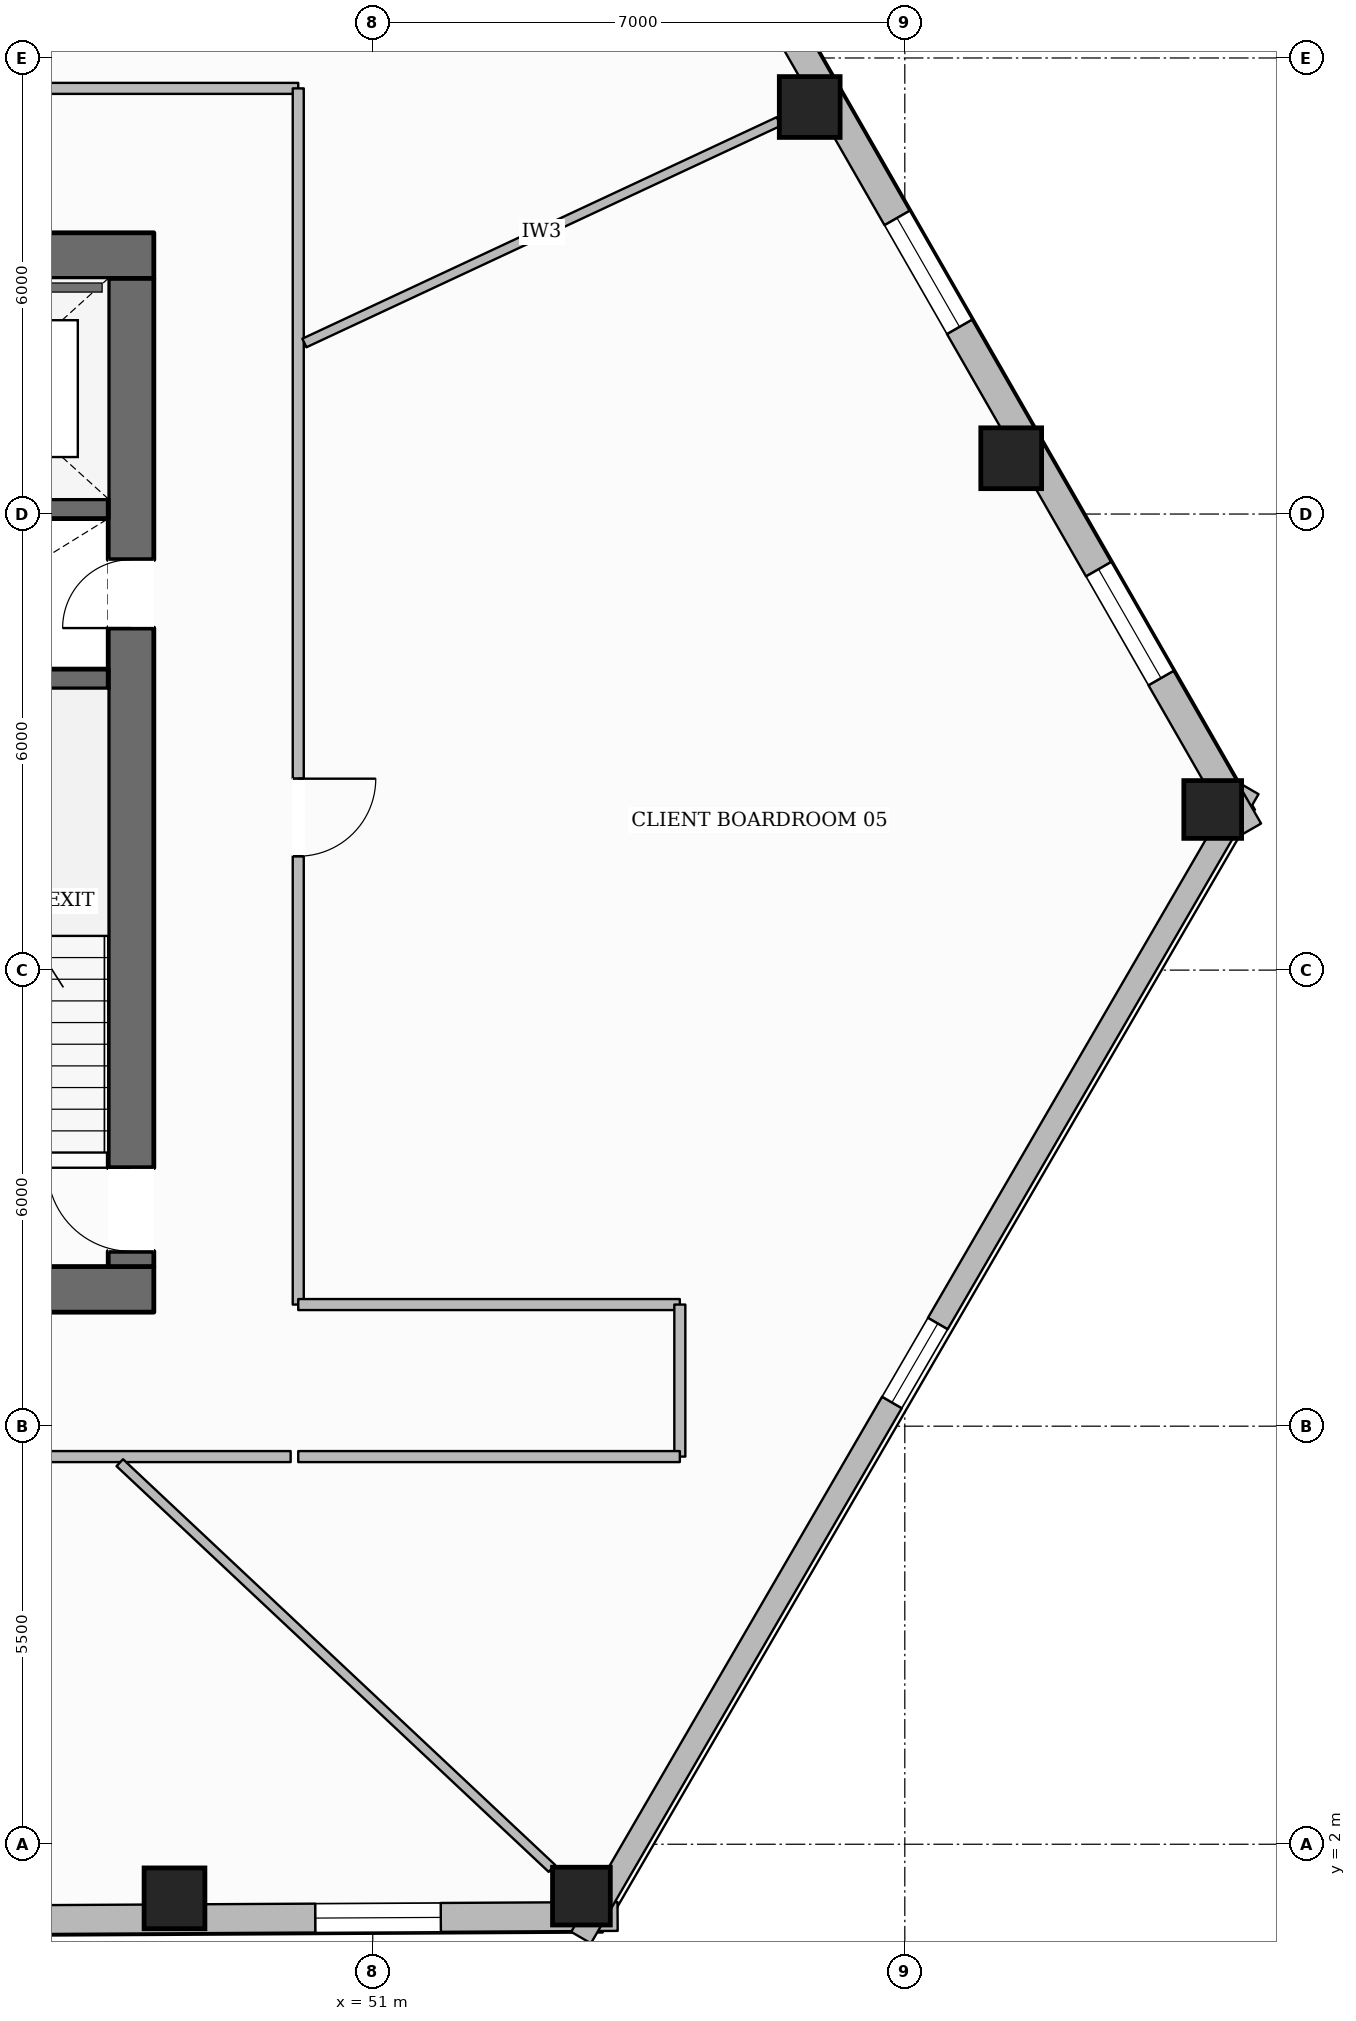
"""IFC4 building model, lengths in metres.
Left out: names, types, materials, properties, quantities, classifications, styles, units other than length and angle.
Written with IfcOpenShell. Run it as: python <this file> out.ifc"""

import sys

from ifc_helpers import new_model, si_unit, direction, frame, frame_2d, origin, origin_2d, place, context, subcontext, project, spatial, rectangle, hollow_rectangle, extrude, element, fill, save


model = new_model("IFC4")
c1 = context("Model", 3, precision=1e-05, world=origin(), true_north=direction((0.0, 1.0)))
c2 = subcontext(c1, "Body", "Model", "MODEL_VIEW")
j1 = project(units=[si_unit("LENGTHUNIT", "METRE"), si_unit("PLANEANGLEUNIT", "RADIAN")], contexts=[c1])
p1 = place(None, origin())
s1 = spatial("IfcSite", under=j1, at=p1, CompositionType="ELEMENT")
p2 = place(p1, origin())
s2 = spatial("IfcBuilding", under=s1, at=p2, CompositionType="ELEMENT")
p3 = place(p2, frame((0.0, 0.0, 6.0)))
s3 = spatial("IfcBuildingStorey", under=s2, at=p3, CompositionType="ELEMENT", Elevation=6.0)
p4 = place(p3, frame((27.88, 9.3, 0.0), z_axis=(0.0, 0.0, 1.0), x_axis=(1.0, 0.0, 0.0)))
e1 = element("IfcWall", 1, at=p4, inside=s3, PredefinedType="SOLIDWALL", context=c2, shape_type="SweptSolid", body=[
    extrude(rectangle(XDim=20.24, YDim=0.6, at=frame_2d((10.12, 0.0))), origin(), (0.0, 0.0, 1.0), 3.59),
])
p5 = place(p4, frame((10.62, 0.0, 0.0)))
e2 = element("IfcOpeningElement", 2, at=p5, cuts=e1, PredefinedType="OPENING", context=c2, shape_type="SweptSolid", body=[
    extrude(rectangle(XDim=1.4, YDim=2.2, at=frame_2d((0.7, 1.1))), frame((0.0, 0.31, 0.0), z_axis=(0.0, -1.0, 0.0), x_axis=(1.0, 0.0, 0.0)), (0.0, 0.0, 1.0), 0.62),
])
p6 = place(p3, frame((27.88, 22.9, 0.0), z_axis=(0.0, 0.0, 1.0), x_axis=(1.0, 0.0, 0.0)))
e3 = element("IfcWall", 3, at=p6, inside=s3, PredefinedType="SOLIDWALL", context=c2, shape_type="SweptSolid", body=[
    extrude(rectangle(XDim=20.24, YDim=0.6, at=frame_2d((10.12, 0.0))), origin(), (0.0, 0.0, 1.0), 3.59),
])
p7 = place(p6, frame((6.395, 0.0, 0.0)))
e4 = element("IfcOpeningElement", 4, at=p7, cuts=e3, PredefinedType="OPENING", context=c2, shape_type="SweptSolid", body=[
    extrude(rectangle(XDim=1.05, YDim=2.15, at=frame_2d((0.525, 1.075))), frame((0.0, 0.31, 0.0), z_axis=(0.0, -1.0, 0.0), x_axis=(1.0, 0.0, 0.0)), (0.0, 0.0, 1.0), 0.62),
])
p8 = place(p6, frame((12.795, 0.0, 0.0)))
e5 = element("IfcOpeningElement", 5, at=p8, cuts=e3, PredefinedType="OPENING", context=c2, shape_type="SweptSolid", body=[
    extrude(rectangle(XDim=1.05, YDim=2.15, at=frame_2d((0.525, 1.075))), frame((0.0, 0.31, 0.0), z_axis=(0.0, -1.0, 0.0), x_axis=(1.0, 0.0, 0.0)), (0.0, 0.0, 1.0), 0.62),
])
p9 = place(p3, frame((47.82, 9.6, 0.0), z_axis=(0.0, 0.0, 1.0), x_axis=(0.0, 1.0, 0.0)))
e6 = element("IfcWall", 6, at=p9, inside=s3, PredefinedType="SOLIDWALL", context=c2, shape_type="SweptSolid", body=[
    extrude(rectangle(XDim=13.0, YDim=0.6, at=frame_2d((6.5, 0.0))), origin(), (0.0, 0.0, 1.0), 3.59),
])
p10 = place(p9, frame((0.2, 0.0, 0.0)))
e7 = element("IfcOpeningElement", 7, at=p10, cuts=e6, PredefinedType="OPENING", context=c2, shape_type="SweptSolid", body=[
    extrude(rectangle(XDim=1.1, YDim=2.15, at=frame_2d((0.55, 1.075))), frame((0.0, 0.31, 0.0), z_axis=(0.0, -1.0, 0.0), x_axis=(1.0, 0.0, 0.0)), (0.0, 0.0, 1.0), 0.62),
])
p11 = place(p9, frame((8.4, 0.0, 0.0)))
e8 = element("IfcOpeningElement", 8, at=p11, cuts=e6, PredefinedType="OPENING", context=c2, shape_type="SweptSolid", body=[
    extrude(rectangle(XDim=0.9, YDim=2.1, at=frame_2d((0.45, 1.05))), frame((0.0, 0.31, 0.0), z_axis=(0.0, -1.0, 0.0), x_axis=(1.0, 0.0, 0.0)), (0.0, 0.0, 1.0), 0.62),
])
for number, where, z_axis, x_axis in (
    (9, (44.32, 17.33, 0.0), (0.0, 0.0, 1.0), (1.0, 0.0, 0.0)),
    (10, (44.32, 19.57, 0.0), (0.0, 0.0, 1.0), (1.0, 0.0, 0.0)),
):
    element("IfcWall", number, at=place(p3, frame(where, z_axis=z_axis, x_axis=x_axis)), inside=s3, PredefinedType="SHEAR", context=c2, shape_type="SweptSolid", body=[
        extrude(rectangle(XDim=3.2, YDim=0.26, at=frame_2d((1.6, 0.0))), origin(), (0.0, 0.0, 1.0), 3.59),
    ])
p12 = place(p3, frame((48.392, 1.288, 0.0), z_axis=(0.0, 0.0, 1.0), x_axis=(1.0, 0.0, 0.0)))
e11 = element("IfcColumn", 11, at=p12, inside=s3, PredefinedType="COLUMN", context=c2, shape_type="SweptSolid", body=[
    extrude(hollow_rectangle(XDim=0.8, YDim=0.8, WallThickness=0.036, at=origin_2d()), origin(), (0.0, 0.0, 1.0), 3.59),
])
for number, where, z_axis, x_axis in (
    (12, (53.746, 1.318, 0.0), (0.0, 0.0, 1.0), (1.0, 0.0, 0.0)),
    (13, (62.051, 15.613, 0.0), (0.0, 0.0, 1.0), (1.0, 0.0, 0.0)),
):
    element("IfcColumn", number, at=place(p3, frame(where, z_axis=z_axis, x_axis=x_axis)), inside=s3, PredefinedType="COLUMN", context=c2, shape_type="SweptSolid", body=[
        extrude(hollow_rectangle(XDim=0.76, YDim=0.76, WallThickness=0.035, at=origin_2d()), origin(), (0.0, 0.0, 1.0), 3.59),
    ])
for number, where, z_axis, x_axis in (
    (14, (59.4, 20.234, 0.0), (0.0, 0.0, 1.0), (1.0, 0.0, 0.0)),
    (15, (56.749, 24.855, 0.0), (0.0, 0.0, 1.0), (1.0, 0.0, 0.0)),
):
    element("IfcColumn", number, at=place(p3, frame(where, z_axis=z_axis, x_axis=x_axis)), inside=s3, PredefinedType="COLUMN", context=c2, shape_type="SweptSolid", body=[
        extrude(hollow_rectangle(XDim=0.8, YDim=0.8, WallThickness=0.036, at=origin_2d()), origin(), (0.0, 0.0, 1.0), 3.59),
    ])
p13 = place(p3, frame((54.221, 1.05, 0.0), z_axis=(0.0, 0.0, 1.0), x_axis=(-0.999985122688, -0.005454759556, 0.0)))
e16 = element("IfcWall", 16, at=p13, inside=s3, PredefinedType="STANDARD", context=c2, shape_type="SweptSolid", body=[
    extrude(rectangle(XDim=33.076, YDim=0.38, at=frame_2d((16.538, 0.0))), origin(), (0.0, 0.0, 1.0), 2.97),
])
p14 = place(p13, frame((29.094, 0.0, 0.65)))
e17 = element("IfcOpeningElement", 17, at=p14, cuts=e16, PredefinedType="OPENING", context=c2, shape_type="SweptSolid", body=[
    extrude(rectangle(XDim=1.65, YDim=1.75, at=frame_2d((0.825, 0.875))), frame((0.0, 0.2, 0.0), z_axis=(0.0, -1.0, 0.0), x_axis=(1.0, 0.0, 0.0)), (0.0, 0.0, 1.0), 0.4),
])
p15 = place(p13, frame((23.74, 0.0, 0.65)))
e18 = element("IfcOpeningElement", 18, at=p15, cuts=e16, PredefinedType="OPENING", context=c2, shape_type="SweptSolid", body=[
    extrude(rectangle(XDim=1.65, YDim=1.75, at=frame_2d((0.825, 0.875))), frame((0.0, 0.2, 0.0), z_axis=(0.0, -1.0, 0.0), x_axis=(1.0, 0.0, 0.0)), (0.0, 0.0, 1.0), 0.4),
])
p16 = place(p13, frame((13.033, 0.0, 0.65)))
e19 = element("IfcOpeningElement", 19, at=p16, cuts=e16, PredefinedType="OPENING", context=c2, shape_type="SweptSolid", body=[
    extrude(rectangle(XDim=1.65, YDim=1.75, at=frame_2d((0.825, 0.875))), frame((0.0, 0.2, 0.0), z_axis=(0.0, -1.0, 0.0), x_axis=(1.0, 0.0, 0.0)), (0.0, 0.0, 1.0), 0.4),
])
p17 = place(p13, frame((7.68, 0.0, 0.65)))
e20 = element("IfcOpeningElement", 20, at=p17, cuts=e16, PredefinedType="OPENING", context=c2, shape_type="SweptSolid", body=[
    extrude(rectangle(XDim=1.65, YDim=1.75, at=frame_2d((0.825, 0.875))), frame((0.0, 0.2, 0.0), z_axis=(0.0, -1.0, 0.0), x_axis=(1.0, 0.0, 0.0)), (0.0, 0.0, 1.0), 0.4),
])
p18 = place(p13, frame((2.326, 0.0, 0.65)))
e21 = element("IfcOpeningElement", 21, at=p18, cuts=e16, PredefinedType="OPENING", context=c2, shape_type="SweptSolid", body=[
    extrude(rectangle(XDim=1.65, YDim=1.75, at=frame_2d((0.825, 0.875))), frame((0.0, 0.2, 0.0), z_axis=(0.0, -1.0, 0.0), x_axis=(1.0, 0.0, 0.0)), (0.0, 0.0, 1.0), 0.4),
])
p19 = place(p3, frame((62.524, 15.89, 0.0), z_axis=(0.0, 0.0, 1.0), x_axis=(-0.502350077129, -0.864664327938, 0.0)))
e22 = element("IfcWall", 22, at=p19, inside=s3, PredefinedType="STANDARD", context=c2, shape_type="SweptSolid", body=[
    extrude(rectangle(XDim=17.485, YDim=0.3, at=frame_2d((8.742, 0.0))), origin(), (0.0, 0.0, 1.0), 2.97),
])
p20 = place(p19, frame((8.142, 0.0, 0.65)))
e23 = element("IfcOpeningElement", 23, at=p20, cuts=e22, PredefinedType="OPENING", context=c2, shape_type="SweptSolid", body=[
    extrude(rectangle(XDim=1.2, YDim=1.7, at=frame_2d((0.6, 0.85))), frame((0.0, 0.16, 0.0), z_axis=(0.0, -1.0, 0.0), x_axis=(1.0, 0.0, 0.0)), (0.0, 0.0, 1.0), 0.32),
])
p21 = place(p3, frame((46.14, 43.889, 0.0), z_axis=(0.0, 0.0, 1.0), x_axis=(0.497625280375, -0.86739211452, 0.0)))
e24 = element("IfcWall", 24, at=p21, inside=s3, PredefinedType="STANDARD", context=c2, shape_type="SweptSolid", body=[
    extrude(rectangle(XDim=32.921, YDim=0.38, at=frame_2d((16.46, 0.0))), origin(), (0.0, 0.0, 1.0), 2.97),
])
p22 = place(p21, frame((28.955, 0.0, 0.65)))
e25 = element("IfcOpeningElement", 25, at=p22, cuts=e24, PredefinedType="OPENING", context=c2, shape_type="SweptSolid", body=[
    extrude(rectangle(XDim=1.65, YDim=1.75, at=frame_2d((0.825, 0.875))), frame((0.0, 0.2, 0.0), z_axis=(0.0, -1.0, 0.0), x_axis=(1.0, 0.0, 0.0)), (0.0, 0.0, 1.0), 0.4),
])
p23 = place(p21, frame((23.628, 0.0, 0.65)))
e26 = element("IfcOpeningElement", 26, at=p23, cuts=e24, PredefinedType="OPENING", context=c2, shape_type="SweptSolid", body=[
    extrude(rectangle(XDim=1.65, YDim=1.75, at=frame_2d((0.825, 0.875))), frame((0.0, 0.2, 0.0), z_axis=(0.0, -1.0, 0.0), x_axis=(1.0, 0.0, 0.0)), (0.0, 0.0, 1.0), 0.4),
])
p24 = place(p21, frame((12.973, 0.0, 0.65)))
e27 = element("IfcOpeningElement", 27, at=p24, cuts=e24, PredefinedType="OPENING", context=c2, shape_type="SweptSolid", body=[
    extrude(rectangle(XDim=1.65, YDim=1.75, at=frame_2d((0.825, 0.875))), frame((0.0, 0.2, 0.0), z_axis=(0.0, -1.0, 0.0), x_axis=(1.0, 0.0, 0.0)), (0.0, 0.0, 1.0), 0.4),
])
p25 = place(p21, frame((7.646, 0.0, 0.65)))
e28 = element("IfcOpeningElement", 28, at=p25, cuts=e24, PredefinedType="OPENING", context=c2, shape_type="SweptSolid", body=[
    extrude(rectangle(XDim=1.65, YDim=1.75, at=frame_2d((0.825, 0.875))), frame((0.0, 0.2, 0.0), z_axis=(0.0, -1.0, 0.0), x_axis=(1.0, 0.0, 0.0)), (0.0, 0.0, 1.0), 0.4),
])
p26 = place(p21, frame((2.319, 0.0, 0.65)))
e29 = element("IfcOpeningElement", 29, at=p26, cuts=e24, PredefinedType="OPENING", context=c2, shape_type="SweptSolid", body=[
    extrude(rectangle(XDim=1.65, YDim=1.75, at=frame_2d((0.825, 0.875))), frame((0.0, 0.2, 0.0), z_axis=(0.0, -1.0, 0.0), x_axis=(1.0, 0.0, 0.0)), (0.0, 0.0, 1.0), 0.4),
])
p27 = place(p3, frame((39.0, 25.1, 0.0), z_axis=(0.0, 0.0, 1.0), x_axis=(1.0, 0.0, 0.0)))
e30 = element("IfcWall", 30, at=p27, inside=s3, PredefinedType="PARTITIONING", context=c2, shape_type="SweptSolid", body=[
    extrude(rectangle(XDim=11.02, YDim=0.145, at=frame_2d((5.51, 0.0))), origin(), (0.0, 0.0, 1.0), 3.59),
])
p28 = place(p3, frame((50.02, 25.1, 0.0), z_axis=(0.0, 0.0, 1.0), x_axis=(0.0, -1.0, 0.0)))
e31 = element("IfcWall", 31, at=p28, inside=s3, PredefinedType="PARTITIONING", context=c2, shape_type="SweptSolid", body=[
    extrude(rectangle(XDim=16.0, YDim=0.145, at=frame_2d((8.0, 0.0))), origin(), (0.0, 0.0, 1.0), 3.278),
])
p29 = place(p28, frame((9.082, 0.0, 0.0)))
e32 = element("IfcOpeningElement", 32, at=p29, cuts=e31, PredefinedType="OPENING", context=c2, shape_type="SweptSolid", body=[
    extrude(rectangle(XDim=1.02, YDim=2.15, at=frame_2d((0.51, 1.075))), frame((0.0, 0.083, 0.0), z_axis=(0.0, -1.0, 0.0), x_axis=(1.0, 0.0, 0.0)), (0.0, 0.0, 1.0), 0.165),
])
p30 = place(p3, frame((50.02, 9.1, 0.0), z_axis=(0.0, 0.0, 1.0), x_axis=(1.0, 0.0, 0.0)))
e33 = element("IfcWall", 33, at=p30, inside=s3, PredefinedType="PARTITIONING", context=c2, shape_type="SweptSolid", body=[
    extrude(rectangle(XDim=5.02, YDim=0.145, at=frame_2d((2.51, 0.0))), origin(), (0.0, 0.0, 1.0), 3.59),
])
p31 = place(p3, frame((55.04, 9.1, 0.0), z_axis=(0.0, 0.0, 1.0), x_axis=(0.0, -1.0, 0.0)))
e34 = element("IfcWall", 34, at=p31, inside=s3, PredefinedType="PARTITIONING", context=c2, shape_type="SweptSolid", body=[
    extrude(rectangle(XDim=2.0, YDim=0.145, at=frame_2d((1.0, 0.0))), origin(), (0.0, 0.0, 1.0), 3.59),
])
p32 = place(p3, frame((55.04, 7.1, 0.0), z_axis=(0.0, 0.0, 1.0), x_axis=(-1.0, 0.0, 0.0)))
e35 = element("IfcWall", 35, at=p32, inside=s3, PredefinedType="PARTITIONING", context=c2, shape_type="SweptSolid", body=[
    extrude(rectangle(XDim=5.02, YDim=0.145, at=frame_2d((2.51, 0.0))), origin(), (0.0, 0.0, 1.0), 3.59),
])
p33 = place(p3, frame((49.92, 7.1, 0.0), z_axis=(0.0, 0.0, 1.0), x_axis=(-1.0, 0.0, 0.0)))
e36 = element("IfcWall", 36, at=p33, inside=s3, PredefinedType="PARTITIONING", context=c2, shape_type="SweptSolid", body=[
    extrude(rectangle(XDim=23.84, YDim=0.145, at=frame_2d((11.92, 0.0))), origin(), (0.0, 0.0, 1.0), 3.278),
])
p34 = place(p33, frame((12.496, 0.0, 0.0)))
e37 = element("IfcOpeningElement", 37, at=p34, cuts=e36, PredefinedType="OPENING", context=c2, shape_type="SweptSolid", body=[
    extrude(rectangle(XDim=1.02, YDim=2.15, at=frame_2d((0.51, 1.075))), frame((0.0, 0.083, 0.0), z_axis=(0.0, -1.0, 0.0), x_axis=(1.0, 0.0, 0.0)), (0.0, 0.0, 1.0), 0.165),
])
p35 = place(p3, frame((50.101, 21.75, 0.0), z_axis=(0.0, 0.0, 1.0), x_axis=(0.906074434546, 0.423118327494, 0.0)))
e38 = element("IfcWall", 38, at=p35, inside=s3, PredefinedType="PARTITIONING", context=c2, shape_type="SweptSolid", body=[
    extrude(rectangle(XDim=6.887, YDim=0.125, at=frame_2d((3.444, 0.0))), origin(), (0.0, 0.0, 1.0), 3.057),
])
p36 = place(p3, frame((47.672, 7.02, 0.0), z_axis=(0.0, 0.0, 1.0), x_axis=(0.729045932386, -0.684464775186, 0.0)))
e39 = element("IfcWall", 39, at=p36, inside=s3, PredefinedType="PARTITIONING", context=c2, shape_type="SweptSolid", body=[
    extrude(rectangle(XDim=7.798, YDim=0.125, at=frame_2d((3.899, 0.0))), origin(), (0.0, 0.0, 1.0), 3.057),
])
p37 = place(p18, origin())
e40 = element("IfcWindow", 40, at=p37, inside=s3, PartitioningType="SINGLE_PANEL", PredefinedType="WINDOW", context=c2, shape_type="SweptSolid", body=[
    extrude(rectangle(XDim=1.65, YDim=1.75, at=frame_2d((0.825, 0.875))), frame((0.0, 0.03, 0.0), z_axis=(0.0, -1.0, 0.0), x_axis=(1.0, 0.0, 0.0)), (0.0, 0.0, 1.0), 0.06),
])
fill(e21, e40)
p38 = place(p22, origin())
e41 = element("IfcWindow", 41, at=p38, inside=s3, PartitioningType="SINGLE_PANEL", PredefinedType="WINDOW", context=c2, shape_type="SweptSolid", body=[
    extrude(rectangle(XDim=1.65, YDim=1.75, at=frame_2d((0.825, 0.875))), frame((0.0, 0.03, 0.0), z_axis=(0.0, -1.0, 0.0), x_axis=(1.0, 0.0, 0.0)), (0.0, 0.0, 1.0), 0.06),
])
fill(e25, e41)
p39 = place(p23, origin())
e42 = element("IfcWindow", 42, at=p39, inside=s3, PartitioningType="SINGLE_PANEL", PredefinedType="WINDOW", context=c2, shape_type="SweptSolid", body=[
    extrude(rectangle(XDim=1.65, YDim=1.75, at=frame_2d((0.825, 0.875))), frame((0.0, 0.03, 0.0), z_axis=(0.0, -1.0, 0.0), x_axis=(1.0, 0.0, 0.0)), (0.0, 0.0, 1.0), 0.06),
])
fill(e26, e42)
p40 = place(p20, origin())
e43 = element("IfcWindow", 43, at=p40, inside=s3, PartitioningType="SINGLE_PANEL", PredefinedType="WINDOW", context=c2, shape_type="SweptSolid", body=[
    extrude(rectangle(XDim=1.2, YDim=1.7, at=frame_2d((0.6, 0.85))), frame((0.0, 0.03, 0.0), z_axis=(0.0, -1.0, 0.0), x_axis=(1.0, 0.0, 0.0)), (0.0, 0.0, 1.0), 0.06),
])
fill(e23, e43)
p41 = place(p10, origin())
e44 = element("IfcDoor", 44, at=p41, inside=s3, OperationType="SINGLE_SWING_RIGHT", PredefinedType="DOOR", context=c2, shape_type="SweptSolid", body=[
    extrude(rectangle(XDim=1.1, YDim=2.15, at=frame_2d((0.55, 1.075))), frame((0.0, 0.025, 0.0), z_axis=(0.0, -1.0, 0.0), x_axis=(1.0, 0.0, 0.0)), (0.0, 0.0, 1.0), 0.05),
])
fill(e7, e44)
p42 = place(p11, origin())
e45 = element("IfcDoor", 45, at=p42, inside=s3, OperationType="SINGLE_SWING_LEFT", PredefinedType="DOOR", context=c2, shape_type="SweptSolid", body=[
    extrude(rectangle(XDim=0.9, YDim=2.1, at=frame_2d((0.45, 1.05))), frame((0.0, 0.025, 0.0), z_axis=(0.0, -1.0, 0.0), x_axis=(1.0, 0.0, 0.0)), (0.0, 0.0, 1.0), 0.05),
])
fill(e8, e45)
p43 = place(p29, origin())
e46 = element("IfcDoor", 46, at=p43, inside=s3, OperationType="SINGLE_SWING_LEFT", PredefinedType="DOOR", context=c2, shape_type="SweptSolid", body=[
    extrude(rectangle(XDim=1.02, YDim=2.15, at=frame_2d((0.51, 1.075))), frame((0.0, 0.025, 0.0), z_axis=(0.0, -1.0, 0.0), x_axis=(1.0, 0.0, 0.0)), (0.0, 0.0, 1.0), 0.05),
])
fill(e32, e46)
save(model, sys.argv[1])
